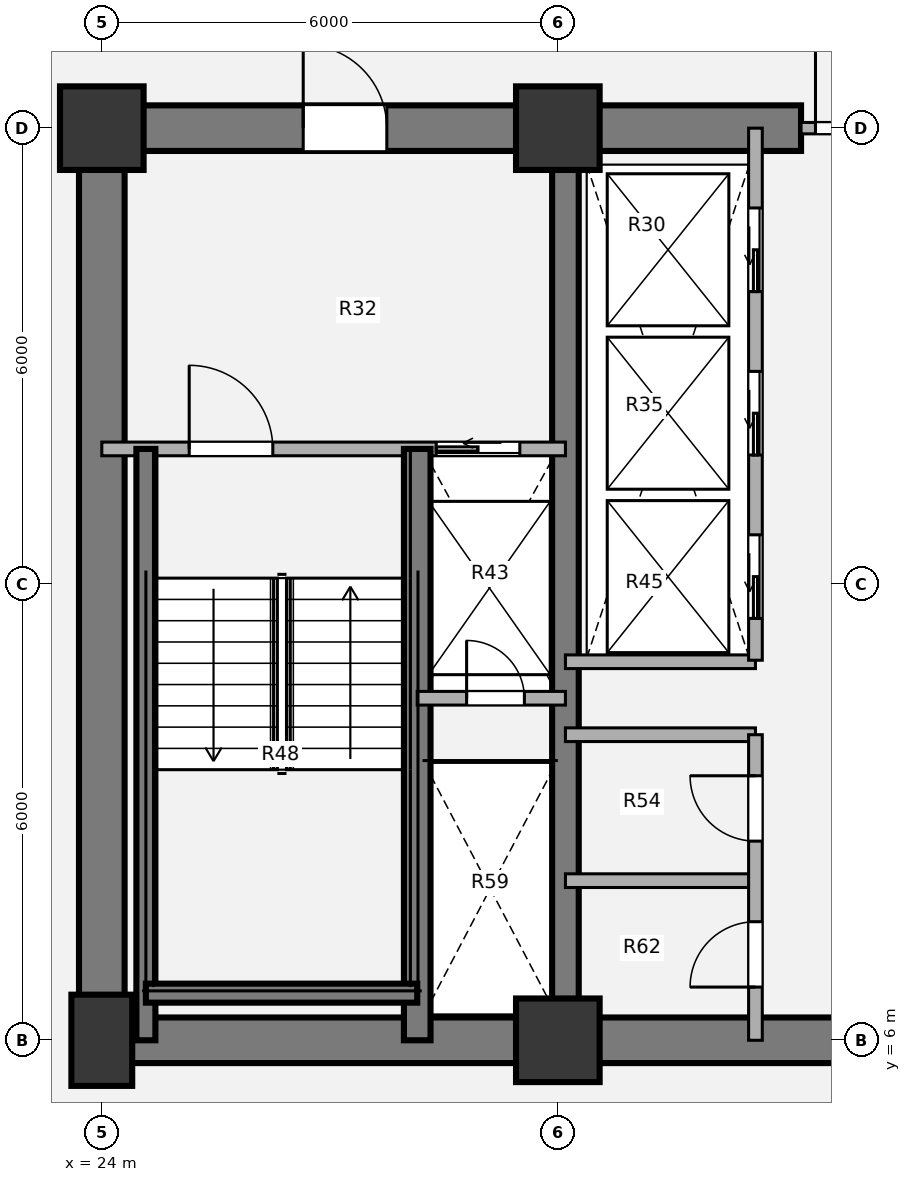
"""IFC4 building model, lengths in metres.
Left out: names, types, materials, properties, quantities, classifications, styles, units other than length and angle.
Written with IfcOpenShell. Run it as: python <this file> out.ifc"""

import sys

from ifc_helpers import new_model, si_unit, direction, frame, frame_2d, origin, origin_2d, place, context, subcontext, project, spatial, rectangle, extrude, source, transform, mapped, element, fill, save


model = new_model("IFC4")
c1 = context("Model", 3, precision=1e-05, world=origin(), true_north=direction((0.0, 1.0)))
c2 = subcontext(c1, "Body", "Model", "MODEL_VIEW")
j1 = project(units=[si_unit("LENGTHUNIT", "METRE"), si_unit("PLANEANGLEUNIT", "RADIAN")], contexts=[c1])
p1 = place(None, origin())
s1 = spatial("IfcSite", under=j1, at=p1, CompositionType="ELEMENT")
p2 = place(p1, origin())
s2 = spatial("IfcBuilding", under=s1, at=p2, CompositionType="ELEMENT")
p3 = place(p2, frame((0.0, 0.0, 64.8)))
s3 = spatial("IfcBuildingStorey", under=s2, at=p3, CompositionType="ELEMENT", Elevation=64.8)
m1 = source(origin(), c2, "Body", "SweptSolid", [
    extrude(rectangle(XDim=0.8, YDim=1.2, at=origin_2d()), origin(), (0.0, 0.0, 1.0), 3.78),
])
p4 = place(p3, frame((24.0, 6.0, 0.0), z_axis=(0.0, 0.0, 1.0), x_axis=(1.0, 0.0, 0.0)))
e1 = element("IfcColumn", 1, at=p4, inside=s3, PredefinedType="COLUMN", context=c2, shape_type="MappedRepresentation", body=[
    mapped(m1, transform((0.0, 0.0, 0.0), x_axis=(1.0, 0.0, 0.0), y_axis=(0.0, 1.0, 0.0), z_axis=(0.0, 0.0, 1.0), scale=1.0)),
])
m2 = source(origin(), c2, "Body", "SweptSolid", [
    extrude(rectangle(XDim=1.1, YDim=1.1, at=origin_2d()), origin(), (0.0, 0.0, 1.0), 3.78),
])
for number, where, z_axis, x_axis in (
    (2, (30.0, 6.0, 0.0), (0.0, 0.0, 1.0), (1.0, 0.0, 0.0)),
    (3, (24.0, 18.0, 0.0), (0.0, 0.0, 1.0), (1.0, 0.0, 0.0)),
    (4, (30.0, 18.0, 0.0), (0.0, 0.0, 1.0), (1.0, 0.0, 0.0)),
):
    element("IfcColumn", number, at=place(p3, frame(where, z_axis=z_axis, x_axis=x_axis)), inside=s3, PredefinedType="COLUMN", context=c2, shape_type="MappedRepresentation", body=[
        mapped(m2, transform((0.0, 0.0, 0.0), x_axis=(1.0, 0.0, 0.0), y_axis=(0.0, 1.0, 0.0), z_axis=(0.0, 0.0, 1.0), scale=1.0)),
    ])
p5 = place(p3, frame((48.3, 6.0, 0.0), z_axis=(0.0, 0.0, 1.0), x_axis=(-1.0, 0.0, 0.0)))
e5 = element("IfcWall", 5, at=p5, inside=s3, PredefinedType="SHEAR", context=c2, shape_type="SweptSolid", body=[
    extrude(rectangle(XDim=24.6, YDim=0.6, at=frame_2d((12.3, 0.0))), origin(), (0.0, 0.0, 1.0), 3.78),
])
p6 = place(p3, frame((24.0, 6.0, 0.0), z_axis=(0.0, 0.0, 1.0), x_axis=(0.0, 1.0, 0.0)))
e6 = element("IfcWall", 6, at=p6, inside=s3, PredefinedType="SHEAR", context=c2, shape_type="SweptSolid", body=[
    extrude(rectangle(XDim=12.0, YDim=0.6, at=frame_2d((6.0, 0.0))), origin(), (0.0, 0.0, 1.0), 3.78),
])
p7 = place(p3, frame((23.7, 18.0, 0.0), z_axis=(0.0, 0.0, 1.0), x_axis=(1.0, 0.0, 0.0)))
e7 = element("IfcWall", 7, at=p7, inside=s3, PredefinedType="SHEAR", context=c2, shape_type="SweptSolid", body=[
    extrude(rectangle(XDim=9.5, YDim=0.6, at=frame_2d((4.75, 0.0))), origin(), (0.0, 0.0, 1.0), 3.78),
])
p8 = place(p7, frame((2.95, 0.0, 0.0)))
e8 = element("IfcOpeningElement", 8, at=p8, cuts=e7, PredefinedType="OPENING", context=c2, shape_type="SweptSolid", body=[
    extrude(rectangle(XDim=1.1, YDim=2.1, at=origin_2d()), frame((0.55, 0.31, 1.05), z_axis=(0.0, -1.0, 0.0), x_axis=(1.0, 0.0, 0.0)), (0.0, 0.0, 1.0), 0.62),
])
p9 = place(p3, frame((30.1, 6.0, 0.0), z_axis=(0.0, 0.0, 1.0), x_axis=(0.0, 1.0, 0.0)))
e9 = element("IfcWall", 9, at=p9, inside=s3, PredefinedType="SHEAR", context=c2, shape_type="SweptSolid", body=[
    extrude(rectangle(XDim=12.0, YDim=0.35, at=frame_2d((6.0, 0.0))), origin(), (0.0, 0.0, 1.0), 3.78),
])
for number, where, z_axis, x_axis in (
    (10, (30.1, 10.98, 0.0), (0.0, 0.0, 1.0), (1.0, 0.0, 0.0)),
    (11, (30.1, 8.1, 0.0), (0.0, 0.0, 1.0), (1.0, 0.0, 0.0)),
    (12, (30.1, 10.02, 0.0), (0.0, 0.0, 1.0), (1.0, 0.0, 0.0)),
):
    element("IfcWall", number, at=place(p3, frame(where, z_axis=z_axis, x_axis=x_axis)), inside=s3, PredefinedType="PARTITIONING", context=c2, shape_type="SweptSolid", body=[
        extrude(rectangle(XDim=2.5, YDim=0.18, at=frame_2d((1.25, 0.0))), origin(), (0.0, 0.0, 1.0), 3.5),
    ])
p10 = place(p3, frame((32.6, 6.0, 0.0), z_axis=(0.0, 0.0, 1.0), x_axis=(0.0, 1.0, 0.0)))
e13 = element("IfcWall", 13, at=p10, inside=s3, PredefinedType="PARTITIONING", context=c2, shape_type="SweptSolid", body=[
    extrude(rectangle(XDim=4.02, YDim=0.18, at=frame_2d((2.01, 0.0))), origin(), (0.0, 0.0, 1.0), 3.5),
])
p11 = place(p10, frame((0.7, 0.0, 0.0)))
e14 = element("IfcOpeningElement", 14, at=p11, cuts=e13, PredefinedType="OPENING", context=c2, shape_type="SweptSolid", body=[
    extrude(rectangle(XDim=0.86, YDim=2.1, at=origin_2d()), frame((0.43, 0.1, 1.05), z_axis=(0.0, -1.0, 0.0), x_axis=(1.0, 0.0, 0.0)), (0.0, 0.0, 1.0), 0.2),
])
p12 = place(p10, frame((2.62, 0.0, 0.0)))
e15 = element("IfcOpeningElement", 15, at=p12, cuts=e13, PredefinedType="OPENING", context=c2, shape_type="SweptSolid", body=[
    extrude(rectangle(XDim=0.86, YDim=2.1, at=origin_2d()), frame((0.43, 0.1, 1.05), z_axis=(0.0, -1.0, 0.0), x_axis=(1.0, 0.0, 0.0)), (0.0, 0.0, 1.0), 0.2),
])
p13 = place(p3, frame((33.2, 18.0, 0.0), z_axis=(0.0, 0.0, 1.0), x_axis=(1.0, 0.0, 0.0)))
e16 = element("IfcWall", 16, at=p13, inside=s3, PredefinedType="PARTITIONING", context=c2, shape_type="SweptSolid", body=[
    extrude(rectangle(XDim=5.6, YDim=0.15, at=frame_2d((2.8, 0.0))), origin(), (0.0, 0.0, 1.0), 2.315),
])
p14 = place(p13, frame((0.19, 0.0, 0.0)))
e17 = element("IfcOpeningElement", 17, at=p14, cuts=e16, PredefinedType="OPENING", context=c2, shape_type="SweptSolid", body=[
    extrude(rectangle(XDim=1.1, YDim=2.1, at=origin_2d()), frame((0.55, 0.085, 1.05), z_axis=(0.0, -1.0, 0.0), x_axis=(1.0, 0.0, 0.0)), (0.0, 0.0, 1.0), 0.17),
])
p15 = place(p13, frame((4.31, 0.0, 0.0)))
e18 = element("IfcOpeningElement", 18, at=p15, cuts=e16, PredefinedType="OPENING", context=c2, shape_type="SweptSolid", body=[
    extrude(rectangle(XDim=1.1, YDim=2.1, at=origin_2d()), frame((0.55, 0.085, 1.05), z_axis=(0.0, -1.0, 0.0), x_axis=(1.0, 0.0, 0.0)), (0.0, 0.0, 1.0), 0.17),
])
p16 = place(p3, frame((24.0, 13.78, 0.0), z_axis=(0.0, 0.0, 1.0), x_axis=(1.0, 0.0, 0.0)))
e19 = element("IfcWall", 19, at=p16, inside=s3, PredefinedType="PARTITIONING", context=c2, shape_type="SweptSolid", body=[
    extrude(rectangle(XDim=6.1, YDim=0.18, at=frame_2d((3.05, 0.0))), origin(), (0.0, 0.0, 1.0), 3.5),
])
p17 = place(p16, frame((1.15, 0.0, 0.0)))
e20 = element("IfcOpeningElement", 20, at=p17, cuts=e19, PredefinedType="OPENING", context=c2, shape_type="SweptSolid", body=[
    extrude(rectangle(XDim=1.1, YDim=2.1, at=origin_2d()), frame((0.55, 0.1, 1.05), z_axis=(0.0, -1.0, 0.0), x_axis=(1.0, 0.0, 0.0)), (0.0, 0.0, 1.0), 0.2),
])
p18 = place(p16, frame((4.4, 0.0, 0.0)))
e21 = element("IfcOpeningElement", 21, at=p18, cuts=e19, PredefinedType="OPENING", context=c2, shape_type="SweptSolid", body=[
    extrude(rectangle(XDim=1.1, YDim=2.1, at=origin_2d()), frame((0.55, 0.1, 1.05), z_axis=(0.0, -1.0, 0.0), x_axis=(1.0, 0.0, 0.0)), (0.0, 0.0, 1.0), 0.2),
])
p19 = place(p3, frame((28.15, 6.0, 0.0), z_axis=(0.0, 0.0, 1.0), x_axis=(0.0, 1.0, 0.0)))
e22 = element("IfcWall", 22, at=p19, inside=s3, PredefinedType="SHEAR", context=c2, shape_type="SweptSolid", body=[
    extrude(rectangle(XDim=7.78, YDim=0.35, at=frame_2d((3.89, 0.0))), origin(), (0.0, 0.0, 1.0), 3.85),
])
p20 = place(p3, frame((24.58, 6.0, 0.0), z_axis=(0.0, 0.0, 1.0), x_axis=(0.0, 1.0, 0.0)))
e23 = element("IfcWall", 23, at=p20, inside=s3, PredefinedType="SHEAR", context=c2, shape_type="SweptSolid", body=[
    extrude(rectangle(XDim=7.78, YDim=0.25, at=frame_2d((3.89, 0.0))), origin(), (0.0, 0.0, 1.0), 3.85),
])
p21 = place(p3, frame((24.58, 6.62, 0.0), z_axis=(0.0, 0.0, 1.0), x_axis=(1.0, 0.0, 0.0)))
e24 = element("IfcWall", 24, at=p21, inside=s3, PredefinedType="SHEAR", context=c2, shape_type="SweptSolid", body=[
    extrude(rectangle(XDim=3.57, YDim=0.25, at=frame_2d((1.785, 0.0))), origin(), (0.0, 0.0, 1.0), 3.85),
])
p22 = place(p3, frame((28.15, 10.5, 0.0), z_axis=(0.0, 0.0, 1.0), x_axis=(1.0, 0.0, 0.0)))
e25 = element("IfcWall", 25, at=p22, inside=s3, PredefinedType="PARTITIONING", context=c2, shape_type="SweptSolid", body=[
    extrude(rectangle(XDim=1.95, YDim=0.18, at=frame_2d((0.975, 0.0))), origin(), (0.0, 0.0, 1.0), 3.5),
])
p23 = place(p22, frame((0.65, 0.0, 0.0)))
e26 = element("IfcOpeningElement", 26, at=p23, cuts=e25, PredefinedType="OPENING", context=c2, shape_type="SweptSolid", body=[
    extrude(rectangle(XDim=0.76, YDim=2.05, at=origin_2d()), frame((0.38, 0.1, 1.025), z_axis=(0.0, -1.0, 0.0), x_axis=(1.0, 0.0, 0.0)), (0.0, 0.0, 1.0), 0.2),
])
p24 = place(p3, frame((32.6, 11.0, 0.0), z_axis=(0.0, 0.0, 1.0), x_axis=(0.0, 1.0, 0.0)))
e27 = element("IfcWall", 27, at=p24, inside=s3, PredefinedType="PARTITIONING", context=c2, shape_type="SweptSolid", body=[
    extrude(rectangle(XDim=7.0, YDim=0.18, at=frame_2d((3.5, 0.0))), origin(), (0.0, 0.0, 1.0), 3.5),
])
p25 = place(p24, frame((0.55, 0.0, 0.0)))
e28 = element("IfcOpeningElement", 28, at=p25, cuts=e27, PredefinedType="OPENING", context=c2, shape_type="SweptSolid", body=[
    extrude(rectangle(XDim=1.1, YDim=2.1, at=origin_2d()), frame((0.55, 0.1, 1.05), z_axis=(0.0, -1.0, 0.0), x_axis=(1.0, 0.0, 0.0)), (0.0, 0.0, 1.0), 0.2),
])
p26 = place(p24, frame((2.7, 0.0, 0.0)))
e29 = element("IfcOpeningElement", 29, at=p26, cuts=e27, PredefinedType="OPENING", context=c2, shape_type="SweptSolid", body=[
    extrude(rectangle(XDim=1.1, YDim=2.1, at=origin_2d()), frame((0.55, 0.1, 1.05), z_axis=(0.0, -1.0, 0.0), x_axis=(1.0, 0.0, 0.0)), (0.0, 0.0, 1.0), 0.2),
])
p27 = place(p24, frame((4.85, 0.0, 0.0)))
e30 = element("IfcOpeningElement", 30, at=p27, cuts=e27, PredefinedType="OPENING", context=c2, shape_type="SweptSolid", body=[
    extrude(rectangle(XDim=1.1, YDim=2.1, at=origin_2d()), frame((0.55, 0.1, 1.05), z_axis=(0.0, -1.0, 0.0), x_axis=(1.0, 0.0, 0.0)), (0.0, 0.0, 1.0), 0.2),
])
m3 = source(origin(), c2, "Body", "SweptSolid", [
    extrude(rectangle(XDim=0.86, YDim=2.1, at=origin_2d()), frame((0.43, 0.025, 1.05), z_axis=(0.0, -1.0, 0.0), x_axis=(1.0, 0.0, 0.0)), (0.0, 0.0, 1.0), 0.05),
])
p28 = place(p11, origin())
e31 = element("IfcDoor", 31, at=p28, inside=s3, OperationType="SINGLE_SWING_LEFT", PredefinedType="DOOR", context=c2, shape_type="MappedRepresentation", body=[
    mapped(m3, transform((0.0, 0.0, 0.0), x_axis=(1.0, 0.0, 0.0), y_axis=(0.0, 1.0, 0.0), z_axis=(0.0, 0.0, 1.0), scale=1.0)),
])
fill(e14, e31)
p29 = place(p12, origin())
e32 = element("IfcDoor", 32, at=p29, inside=s3, OperationType="SINGLE_SWING_RIGHT", PredefinedType="DOOR", context=c2, shape_type="MappedRepresentation", body=[
    mapped(m3, transform((0.0, 0.0, 0.0), x_axis=(1.0, 0.0, 0.0), y_axis=(0.0, 1.0, 0.0), z_axis=(0.0, 0.0, 1.0), scale=1.0)),
])
fill(e15, e32)
m4 = source(origin(), c2, "Body", "SweptSolid", [
    extrude(rectangle(XDim=1.1, YDim=2.1, at=origin_2d()), frame((0.55, 0.025, 1.05), z_axis=(0.0, -1.0, 0.0), x_axis=(1.0, 0.0, 0.0)), (0.0, 0.0, 1.0), 0.05),
])
p30 = place(p14, origin())
e33 = element("IfcDoor", 33, at=p30, inside=s3, OperationType="SINGLE_SWING_LEFT", PredefinedType="DOOR", context=c2, shape_type="MappedRepresentation", body=[
    mapped(m4, transform((0.0, 0.0, 0.0), x_axis=(1.0, 0.0, 0.0), y_axis=(0.0, 1.0, 0.0), z_axis=(0.0, 0.0, 1.0), scale=1.0)),
])
fill(e17, e33)
m5 = source(origin(), c2, "Body", "SweptSolid", [
    extrude(rectangle(XDim=1.1, YDim=2.1, at=origin_2d()), frame((0.55, 0.025, 1.05), z_axis=(0.0, -1.0, 0.0), x_axis=(1.0, 0.0, 0.0)), (0.0, 0.0, 1.0), 0.05),
])
p31 = place(p17, origin())
e34 = element("IfcDoor", 34, at=p31, inside=s3, OperationType="SINGLE_SWING_LEFT", PredefinedType="DOOR", context=c2, shape_type="MappedRepresentation", body=[
    mapped(m5, transform((0.0, 0.0, 0.0), x_axis=(1.0, 0.0, 0.0), y_axis=(0.0, 1.0, 0.0), z_axis=(0.0, 0.0, 1.0), scale=1.0)),
])
fill(e20, e34)
m6 = source(origin(), c2, "Body", "SweptSolid", [
    extrude(rectangle(XDim=1.1, YDim=2.1, at=origin_2d()), frame((0.55, 0.025, 1.05), z_axis=(0.0, -1.0, 0.0), x_axis=(1.0, 0.0, 0.0)), (0.0, 0.0, 1.0), 0.05),
])
p32 = place(p18, origin())
e35 = element("IfcDoor", 35, at=p32, inside=s3, OperationType="SLIDING_TO_LEFT", PredefinedType="DOOR", context=c2, shape_type="MappedRepresentation", body=[
    mapped(m6, transform((0.0, 0.0, 0.0), x_axis=(1.0, 0.0, 0.0), y_axis=(0.0, 1.0, 0.0), z_axis=(0.0, 0.0, 1.0), scale=1.0)),
])
fill(e21, e35)
m7 = source(origin(), c2, "Body", "SweptSolid", [
    extrude(rectangle(XDim=0.76, YDim=2.05, at=origin_2d()), frame((0.38, 0.025, 1.025), z_axis=(0.0, -1.0, 0.0), x_axis=(1.0, 0.0, 0.0)), (0.0, 0.0, 1.0), 0.05),
])
p33 = place(p23, origin())
e36 = element("IfcDoor", 36, at=p33, inside=s3, OperationType="SINGLE_SWING_LEFT", PredefinedType="DOOR", context=c2, shape_type="MappedRepresentation", body=[
    mapped(m7, transform((0.0, 0.0, 0.0), x_axis=(1.0, 0.0, 0.0), y_axis=(0.0, 1.0, 0.0), z_axis=(0.0, 0.0, 1.0), scale=1.0)),
])
fill(e26, e36)
p34 = place(p8, origin())
e37 = element("IfcDoor", 37, at=p34, inside=s3, OperationType="SINGLE_SWING_LEFT", PredefinedType="DOOR", context=c2, shape_type="MappedRepresentation", body=[
    mapped(m4, transform((0.0, 0.0, 0.0), x_axis=(1.0, 0.0, 0.0), y_axis=(0.0, 1.0, 0.0), z_axis=(0.0, 0.0, 1.0), scale=1.0)),
])
fill(e8, e37)
p35 = place(p25, origin())
e38 = element("IfcDoor", 38, at=p35, inside=s3, OperationType="SLIDING_TO_LEFT", PredefinedType="DOOR", context=c2, shape_type="MappedRepresentation", body=[
    mapped(m6, transform((0.0, 0.0, 0.0), x_axis=(1.0, 0.0, 0.0), y_axis=(0.0, 1.0, 0.0), z_axis=(0.0, 0.0, 1.0), scale=1.0)),
])
fill(e28, e38)
p36 = place(p26, origin())
e39 = element("IfcDoor", 39, at=p36, inside=s3, OperationType="SLIDING_TO_LEFT", PredefinedType="DOOR", context=c2, shape_type="MappedRepresentation", body=[
    mapped(m6, transform((0.0, 0.0, 0.0), x_axis=(1.0, 0.0, 0.0), y_axis=(0.0, 1.0, 0.0), z_axis=(0.0, 0.0, 1.0), scale=1.0)),
])
fill(e29, e39)
p37 = place(p27, origin())
e40 = element("IfcDoor", 40, at=p37, inside=s3, OperationType="SLIDING_TO_LEFT", PredefinedType="DOOR", context=c2, shape_type="MappedRepresentation", body=[
    mapped(m6, transform((0.0, 0.0, 0.0), x_axis=(1.0, 0.0, 0.0), y_axis=(0.0, 1.0, 0.0), z_axis=(0.0, 0.0, 1.0), scale=1.0)),
])
fill(e30, e40)
save(model, sys.argv[1])
